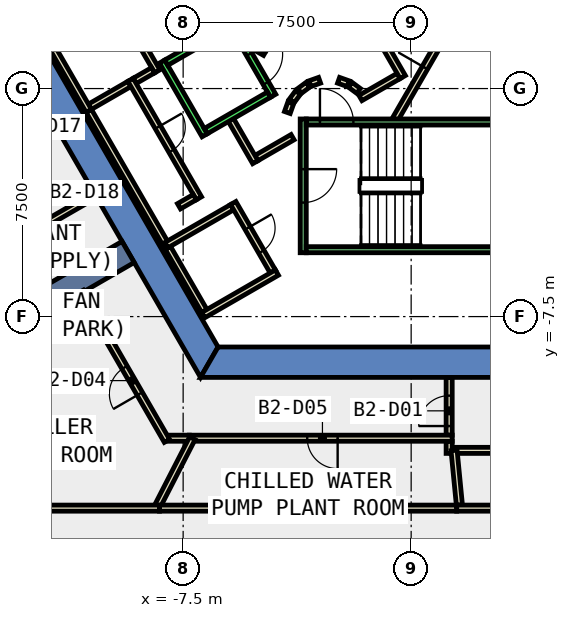
"""IFC4 building model, lengths in metres.
Left out: names, types, materials, properties, quantities, classifications, styles, units other than length and angle.
Written with IfcOpenShell. Run it as: python <this file> out.ifc"""

import sys

from ifc_helpers import new_model, si_unit, direction, frame, frame_2d, origin, place, context, subcontext, project, spatial, polyline, rectangle, outline, extrude, element, fill, save


model = new_model("IFC4")
c1 = context("Model", 3, precision=1e-05, world=origin(), true_north=direction((0.0, 1.0)))
c2 = subcontext(c1, "Body", "Model", "MODEL_VIEW")
j1 = project(units=[si_unit("LENGTHUNIT", "METRE"), si_unit("PLANEANGLEUNIT", "RADIAN")], contexts=[c1])
p1 = place(None, origin())
s1 = spatial("IfcSite", under=j1, at=p1, CompositionType="ELEMENT")
p2 = place(p1, origin())
s2 = spatial("IfcBuilding", under=s1, at=p2, CompositionType="ELEMENT")
p3 = place(p2, frame((0.0, 0.0, -11.0)))
s3 = spatial("IfcBuildingStorey", under=s2, at=p3, CompositionType="ELEMENT", Elevation=-11.0)
p4 = place(p3, frame((0.0, 0.0, -0.42)))
e1 = element("IfcWall", 1, at=p4, inside=s3, PredefinedType="SHEAR", context=c2, shape_type="SweptSolid", body=[
    extrude(outline(polyline([(-13.856, 2.5), (-6.928, -9.5), (-6.351, -8.5), (-12.702, 2.5), (-13.856, 2.5)])), origin(), (0.0, 0.0, 1.0), 5.5),
])
p5 = place(p3, frame((0.0, 0.0, -0.42)))
e2 = element("IfcWall", 2, at=p5, inside=s3, PredefinedType="SHEAR", context=c2, shape_type="SweptSolid", body=[
    extrude(outline(polyline([(3.75, -9.5), (3.75, -8.5), (-6.351, -8.5), (-6.928, -9.5), (3.75, -9.5)])), origin(), (0.0, 0.0, 1.0), 5.5),
])
p6 = place(p3, frame((-9.31, -5.375, -0.42), z_axis=(0.0, 0.0, 1.0), x_axis=(-0.866017533419, -0.500013631625, 0.0)))
e3 = element("IfcWall", 3, at=p6, inside=s3, PredefinedType="SHEAR", context=c2, shape_type="SweptSolid", body=[
    extrude(rectangle(XDim=9.0, YDim=0.8, at=frame_2d((4.5, 0.0))), origin(), (0.0, 0.0, 1.0), 5.5),
])
p7 = place(p3, frame((1.25, -11.4, 0.0), z_axis=(0.0, 0.0, 1.0), x_axis=(0.0, 1.0, 0.0)))
e4 = element("IfcWall", 4, at=p7, inside=s3, PredefinedType="PARTITIONING", context=c2, shape_type="SweptSolid", body=[
    extrude(rectangle(XDim=1.9, YDim=0.2, at=frame_2d((0.95, 0.0))), origin(), (0.0, 0.0, 1.0), 5.05),
])
p8 = place(p7, frame((0.3, 0.0, 0.0)))
e5 = element("IfcOpeningElement", 5, at=p8, cuts=e4, PredefinedType="OPENING", context=c2, shape_type="SweptSolid", body=[
    extrude(rectangle(XDim=1.0, YDim=2.1, at=frame_2d((0.5, 1.05))), frame((0.0, 0.11, 0.0), z_axis=(0.0, -1.0, 0.0), x_axis=(1.0, 0.0, 0.0)), (0.0, 0.0, 1.0), 0.22),
])
p9 = place(p3, frame((8.35, -11.9, 0.0), z_axis=(0.0, 0.0, 1.0), x_axis=(-1.0, 0.0, 0.0)))
e6 = element("IfcWall", 6, at=p9, inside=s3, PredefinedType="PARTITIONING", context=c2, shape_type="SweptSolid", body=[
    extrude(rectangle(XDim=7.039, YDim=0.2, at=frame_2d((3.52, 0.0))), origin(), (0.0, 0.0, 1.0), 5.05),
])
p10 = place(p9, frame((2.659, 0.0, 0.0)))
e7 = element("IfcOpeningElement", 7, at=p10, cuts=e6, PredefinedType="OPENING", context=c2, shape_type="SweptSolid", body=[
    extrude(rectangle(XDim=1.0, YDim=2.1, at=frame_2d((0.5, 1.05))), frame((0.0, 0.11, 0.0), z_axis=(0.0, -1.0, 0.0), x_axis=(1.0, 0.0, 0.0)), (0.0, 0.0, 1.0), 0.22),
])
p11 = place(p3, frame((1.25, -12.0, 0.0), z_axis=(0.0, 0.0, 1.0), x_axis=(0.0, 1.0, 0.0)))
e8 = element("IfcWall", 8, at=p11, inside=s3, PredefinedType="PARTITIONING", context=c2, shape_type="SweptSolid", body=[
    extrude(rectangle(XDim=0.4, YDim=0.2, at=frame_2d((0.2, 0.0))), origin(), (0.0, 0.0, 1.0), 5.05),
])
p12 = place(p3, frame((-7.296, -11.5, 0.0), z_axis=(0.0, 0.0, 1.0), x_axis=(-1.0, 0.0, 0.0)))
e9 = element("IfcWall", 9, at=p12, inside=s3, PredefinedType="PARTITIONING", context=c2, shape_type="SweptSolid", body=[
    extrude(rectangle(XDim=0.687, YDim=0.2, at=frame_2d((0.344, 0.0))), origin(), (0.0, 0.0, 1.0), 5.05),
])
p13 = place(p3, frame((-8.033, -11.587, 0.0), z_axis=(0.0, 0.0, 1.0), x_axis=(-0.499974742752, 0.866039985572, 0.0)))
e10 = element("IfcWall", 10, at=p13, inside=s3, PredefinedType="PARTITIONING", context=c2, shape_type="SweptSolid", body=[
    extrude(rectangle(XDim=5.668, YDim=0.2, at=frame_2d((2.834, 0.0))), origin(), (0.0, 0.0, 1.0), 5.05),
])
p14 = place(p13, frame((1.788, 0.0, 0.0)))
e11 = element("IfcOpeningElement", 11, at=p14, cuts=e10, PredefinedType="OPENING", context=c2, shape_type="SweptSolid", body=[
    extrude(rectangle(XDim=1.0, YDim=2.1, at=frame_2d((0.5, 1.05))), frame((0.0, 0.11, 0.0), z_axis=(0.0, -1.0, 0.0), x_axis=(1.0, 0.0, 0.0)), (0.0, 0.0, 1.0), 0.22),
])
p15 = place(p3, frame((1.35, -11.5, 0.0), z_axis=(0.0, 0.0, 1.0), x_axis=(-1.0, 0.0, 0.0)))
e12 = element("IfcWall", 12, at=p15, inside=s3, PredefinedType="PARTITIONING", context=c2, shape_type="SweptSolid", body=[
    extrude(rectangle(XDim=8.646, YDim=0.2, at=frame_2d((4.323, 0.0))), origin(), (0.0, 0.0, 1.0), 5.05),
])
p16 = place(p15, frame((3.768, 0.0, 0.0)))
e13 = element("IfcOpeningElement", 13, at=p16, cuts=e12, PredefinedType="OPENING", context=c2, shape_type="SweptSolid", body=[
    extrude(rectangle(XDim=1.0, YDim=2.1, at=frame_2d((0.5, 1.05))), frame((0.0, 0.11, 0.0), z_axis=(0.0, -1.0, 0.0), x_axis=(1.0, 0.0, 0.0)), (0.0, 0.0, 1.0), 0.22),
])
p17 = place(p3, frame((1.587, -13.7, 0.0), z_axis=(0.0, 0.0, 1.0), x_axis=(-0.097324991698, 0.99525265435, 0.0)))
e14 = element("IfcWall", 14, at=p17, inside=s3, PredefinedType="PARTITIONING", context=c2, shape_type="SweptSolid", body=[
    extrude(rectangle(XDim=1.809, YDim=0.2, at=frame_2d((0.904, 0.0))), origin(), (0.0, 0.0, 1.0), 5.05),
])
p18 = place(p3, frame((12.651, -13.8, 0.0), z_axis=(0.0, 0.0, 1.0), x_axis=(-1.0, 0.0, 0.0)))
e15 = element("IfcWall", 15, at=p18, inside=s3, PredefinedType="PARTITIONING", context=c2, shape_type="SweptSolid", body=[
    extrude(rectangle(XDim=11.154, YDim=0.2, at=frame_2d((5.577, 0.0))), origin(), (0.0, 0.0, 1.0), 5.05),
])
p19 = place(p18, frame((6.675, 0.0, 0.0)))
e16 = element("IfcOpeningElement", 16, at=p19, cuts=e15, PredefinedType="OPENING", context=c2, shape_type="SweptSolid", body=[
    extrude(rectangle(XDim=1.8, YDim=2.1, at=frame_2d((0.9, 1.05))), frame((0.0, 0.11, 0.0), z_axis=(0.0, -1.0, 0.0), x_axis=(1.0, 0.0, 0.0)), (0.0, 0.0, 1.0), 0.22),
])
p20 = place(p3, frame((-7.196, -11.5, 0.0), z_axis=(0.0, 0.0, 1.0), x_axis=(-0.457008432814, -0.889462361394, 0.0)))
e17 = element("IfcWall", 17, at=p20, inside=s3, PredefinedType="PARTITIONING", context=c2, shape_type="SweptSolid", body=[
    extrude(rectangle(XDim=2.486, YDim=0.2, at=frame_2d((1.243, 0.0))), origin(), (0.0, 0.0, 1.0), 5.05),
])
p21 = place(p3, frame((-8.278, -13.8, 0.0), z_axis=(0.0, 0.0, 1.0), x_axis=(-1.0, 0.0, 0.0)))
e18 = element("IfcWall", 18, at=p21, inside=s3, PredefinedType="PARTITIONING", context=c2, shape_type="SweptSolid", body=[
    extrude(rectangle(XDim=6.822, YDim=0.2, at=frame_2d((3.411, 0.0))), origin(), (0.0, 0.0, 1.0), 5.05),
])
p22 = place(p3, frame((1.497, -13.8, 0.0), z_axis=(0.0, 0.0, 1.0), x_axis=(-1.0, 0.0, 0.0)))
e19 = element("IfcWall", 19, at=p22, inside=s3, PredefinedType="PARTITIONING", context=c2, shape_type="SweptSolid", body=[
    extrude(rectangle(XDim=9.775, YDim=0.2, at=frame_2d((4.888, 0.0))), origin(), (0.0, 0.0, 1.0), 5.05),
])
p23 = place(p3, frame((-10.392, -3.5, 0.0), z_axis=(0.0, 0.0, 1.0), x_axis=(-0.865980106173, -0.500078449558, 0.0)))
e20 = element("IfcWall", 20, at=p23, inside=s3, PredefinedType="PARTITIONING", context=c2, shape_type="SweptSolid", body=[
    extrude(rectangle(XDim=1.9, YDim=0.2, at=frame_2d((0.95, 0.0))), origin(), (0.0, 0.0, 1.0), 5.05),
])
p24 = place(p3, frame((-9.267, 0.152, 0.0), z_axis=(0.0, 0.0, 1.0), x_axis=(-0.86599040064, -0.500060622324, 0.0)))
e21 = element("IfcWall", 21, at=p24, inside=s3, PredefinedType="PARTITIONING", context=c2, shape_type="SweptSolid", body=[
    extrude(rectangle(XDim=1.5, YDim=0.2, at=frame_2d((0.75, 0.0))), origin(), (0.0, 0.0, 1.0), 5.05),
])
p25 = place(p3, frame((-9.651, 2.817, 0.0), z_axis=(0.0, 0.0, 1.0), x_axis=(0.49989585183, -0.866085525409, 0.0)))
e22 = element("IfcWall", 22, at=p25, inside=s3, PredefinedType="PARTITIONING", context=c2, shape_type="SweptSolid", body=[
    extrude(rectangle(XDim=2.6, YDim=0.2, at=frame_2d((1.3, 0.0))), origin(), (0.0, 0.0, 1.0), 5.05),
])
p26 = place(p25, frame((0.75, 0.0, 0.0)))
e23 = element("IfcOpeningElement", 23, at=p26, cuts=e22, PredefinedType="OPENING", context=c2, shape_type="SweptSolid", body=[
    extrude(rectangle(XDim=0.9, YDim=2.1, at=frame_2d((0.45, 1.05))), frame((0.0, 0.11, 0.0), z_axis=(0.0, -1.0, 0.0), x_axis=(1.0, 0.0, 0.0)), (0.0, 0.0, 1.0), 0.22),
])
p27 = place(p3, frame((-8.488, 0.602, 0.0), z_axis=(0.0, 0.0, 1.0), x_axis=(-0.865871789474, -0.500265973451, 0.0)))
e24 = element("IfcWall", 24, at=p27, inside=s3, PredefinedType="PARTITIONING", context=c2, shape_type="SweptSolid", body=[
    extrude(rectangle(XDim=0.7, YDim=0.2, at=frame_2d((0.35, 0.0))), origin(), (0.0, 0.0, 1.0), 5.05),
])
p28 = place(p3, frame((-10.603, -0.735, 0.0), z_axis=(0.0, 0.0, 1.0), x_axis=(-0.499925626596, 0.866068339032, 0.0)))
e25 = element("IfcWall", 25, at=p28, inside=s3, PredefinedType="PARTITIONING", context=c2, shape_type="SweptSolid", body=[
    extrude(rectangle(XDim=2.601, YDim=0.2, at=frame_2d((1.3, 0.0))), origin(), (0.0, 0.0, 1.0), 5.05),
])
p29 = place(p3, frame((-9.231, 0.288, 0.0), z_axis=(0.0, 0.0, 1.0), x_axis=(0.500013631625, -0.866017533419, 0.0)))
e26 = element("IfcWall", 26, at=p29, inside=s3, PredefinedType="PARTITIONING", context=c2, shape_type="SweptSolid", body=[
    extrude(rectangle(XDim=4.5, YDim=0.2, at=frame_2d((2.25, 0.0))), origin(), (0.0, 0.0, 1.0), 5.05),
])
p30 = place(p29, frame((1.8, 0.0, 0.0)))
e27 = element("IfcOpeningElement", 27, at=p30, cuts=e26, PredefinedType="OPENING", context=c2, shape_type="SweptSolid", body=[
    extrude(rectangle(XDim=0.9, YDim=2.1, at=frame_2d((0.45, 1.05))), frame((0.0, 0.11, 0.0), z_axis=(0.0, -1.0, 0.0), x_axis=(1.0, 0.0, 0.0)), (0.0, 0.0, 1.0), 0.22),
])
p31 = place(p3, frame((-7.117, -3.572, 0.0), z_axis=(0.0, 0.0, 1.0), x_axis=(-0.866158505053, -0.499769390944, 0.0)))
e28 = element("IfcWall", 28, at=p31, inside=s3, PredefinedType="PARTITIONING", context=c2, shape_type="SweptSolid", body=[
    extrude(rectangle(XDim=0.6, YDim=0.2, at=frame_2d((0.3, 0.0))), origin(), (0.0, 0.0, 1.0), 5.05),
])
p32 = place(p3, frame((-8.003, -5.238, 0.0), z_axis=(0.0, 0.0, 1.0), x_axis=(-0.500047596559, 0.865997922154, 0.0)))
e29 = element("IfcWall", 29, at=p32, inside=s3, PredefinedType="PARTITIONING", context=c2, shape_type="SweptSolid", body=[
    extrude(rectangle(XDim=5.2, YDim=0.2, at=frame_2d((2.6, 0.0))), origin(), (0.0, 0.0, 1.0), 5.05),
])
p33 = place(p3, frame((-6.803, -7.317, 0.0), z_axis=(0.0, 0.0, 1.0), x_axis=(-0.499913221443, 0.866075499611, 0.0)))
e30 = element("IfcWall", 30, at=p33, inside=s3, PredefinedType="PARTITIONING", context=c2, shape_type="SweptSolid", body=[
    extrude(rectangle(XDim=2.4, YDim=0.2, at=frame_2d((1.2, 0.0))), origin(), (0.0, 0.0, 1.0), 5.05),
])
p34 = place(p3, frame((-8.053, -5.151, 0.0), z_axis=(0.0, 0.0, 1.0), x_axis=(0.866234368172, 0.499637888272, 0.0)))
e31 = element("IfcWall", 31, at=p34, inside=s3, PredefinedType="PARTITIONING", context=c2, shape_type="SweptSolid", body=[
    extrude(rectangle(XDim=2.499, YDim=0.2, at=frame_2d((1.25, 0.0))), origin(), (0.0, 0.0, 1.0), 5.05),
])
p35 = place(p3, frame((-5.851, -3.765, 0.0), z_axis=(0.0, 0.0, 1.0), x_axis=(0.499925626596, -0.866068339032, 0.0)))
e32 = element("IfcWall", 32, at=p35, inside=s3, PredefinedType="PARTITIONING", context=c2, shape_type="SweptSolid", body=[
    extrude(rectangle(XDim=2.601, YDim=0.2, at=frame_2d((1.3, 0.0))), origin(), (0.0, 0.0, 1.0), 5.05),
])
p36 = place(p35, frame((0.95, 0.0, 0.0)))
e33 = element("IfcOpeningElement", 33, at=p36, cuts=e32, PredefinedType="OPENING", context=c2, shape_type="SweptSolid", body=[
    extrude(rectangle(XDim=0.9, YDim=2.1, at=frame_2d((0.45, 1.05))), frame((0.0, 0.11, 0.0), z_axis=(0.0, -1.0, 0.0), x_axis=(1.0, 0.0, 0.0)), (0.0, 0.0, 1.0), 0.22),
])
p37 = place(p3, frame((-4.415, -6.053, 0.0), z_axis=(0.0, 0.0, 1.0), x_axis=(-0.866056369097, -0.49994636267, 0.0)))
e34 = element("IfcWall", 34, at=p37, inside=s3, PredefinedType="PARTITIONING", context=c2, shape_type="SweptSolid", body=[
    extrude(rectangle(XDim=2.8, YDim=0.2, at=frame_2d((1.4, 0.0))), origin(), (0.0, 0.0, 1.0), 5.05),
])
p38 = place(p3, frame((-0.52, -1.0, 0.0), z_axis=(0.0, 0.0, 1.0), x_axis=(0.50011622646, 0.865958290007, 0.0)))
e35 = element("IfcWall", 35, at=p38, inside=s3, PredefinedType="PARTITIONING", context=c2, shape_type="SweptSolid", body=[
    extrude(rectangle(XDim=4.991, YDim=0.2, at=frame_2d((2.496, 0.0))), origin(), (0.0, 0.0, 1.0), 5.05),
])
p39 = place(p38, frame((1.945, 0.0, 0.0)))
e36 = element("IfcOpeningElement", 36, at=p39, cuts=e35, PredefinedType="OPENING", context=c2, shape_type="SweptSolid", body=[
    extrude(rectangle(XDim=1.0, YDim=2.1, at=frame_2d((0.5, 1.05))), frame((0.0, 0.11, 0.0), z_axis=(0.0, -1.0, 0.0), x_axis=(1.0, 0.0, 0.0)), (0.0, 0.0, 1.0), 0.22),
])
p40 = place(p3, frame((-0.412, 0.414, 0.0), z_axis=(0.0, 0.0, 1.0), x_axis=(-0.866017369001, -0.500013916395, 0.0)))
e37 = element("IfcWall", 37, at=p40, inside=s3, PredefinedType="PARTITIONING", context=c2, shape_type="SweptSolid", body=[
    extrude(rectangle(XDim=1.45, YDim=0.2, at=frame_2d((0.725, 0.0))), origin(), (0.0, 0.0, 1.0), 5.05),
])
p41 = place(p3, frame((-1.731, -0.077, 0.0), z_axis=(0.0, 0.0, 1.0), x_axis=(-0.804311165252, 0.594208338422, 0.0)))
e38 = element("IfcWall", 38, at=p41, inside=s3, PredefinedType="PARTITIONING", context=c2, shape_type="SweptSolid", body=[
    extrude(rectangle(XDim=0.338, YDim=0.2, at=frame_2d((0.169, 0.0))), origin(), (0.0, 0.0, 1.0), 5.05),
])
p42 = place(p3, frame((-2.07, 0.16, 0.0), z_axis=(0.0, 0.0, 1.0), x_axis=(-0.942199461132, 0.335052496547, 0.0)))
e39 = element("IfcWall", 39, at=p42, inside=s3, PredefinedType="PARTITIONING", context=c2, shape_type="SweptSolid", body=[
    extrude(rectangle(XDim=0.337, YDim=0.2, at=frame_2d((0.169, 0.0))), origin(), (0.0, 0.0, 1.0), 5.05),
])
p43 = place(p3, frame((-3.012, 0.273, 0.0), z_axis=(0.0, 0.0, 1.0), x_axis=(-0.942280615813, -0.334824194261, 0.0)))
e40 = element("IfcWall", 40, at=p43, inside=s3, PredefinedType="PARTITIONING", context=c2, shape_type="SweptSolid", body=[
    extrude(rectangle(XDim=0.338, YDim=0.2, at=frame_2d((0.169, 0.0))), origin(), (0.0, 0.0, 1.0), 5.05),
])
p44 = place(p3, frame((-3.397, 0.124, 0.0), z_axis=(0.0, 0.0, 1.0), x_axis=(-0.804311165252, -0.594208338422, 0.0)))
e41 = element("IfcWall", 41, at=p44, inside=s3, PredefinedType="PARTITIONING", context=c2, shape_type="SweptSolid", body=[
    extrude(rectangle(XDim=0.338, YDim=0.2, at=frame_2d((0.169, 0.0))), origin(), (0.0, 0.0, 1.0), 5.05),
])
p45 = place(p3, frame((-3.723, -0.131, 0.0), z_axis=(0.0, 0.0, 1.0), x_axis=(-0.594675113454, -0.803966112121, 0.0)))
e42 = element("IfcWall", 42, at=p45, inside=s3, PredefinedType="PARTITIONING", context=c2, shape_type="SweptSolid", body=[
    extrude(rectangle(XDim=0.338, YDim=0.2, at=frame_2d((0.169, 0.0))), origin(), (0.0, 0.0, 1.0), 5.05),
])
p46 = place(p3, frame((-3.96, -0.47, 0.0), z_axis=(0.0, 0.0, 1.0), x_axis=(-0.334824194261, -0.942280615813, 0.0)))
e43 = element("IfcWall", 43, at=p46, inside=s3, PredefinedType="PARTITIONING", context=c2, shape_type="SweptSolid", body=[
    extrude(rectangle(XDim=0.338, YDim=0.2, at=frame_2d((0.169, 0.0))), origin(), (0.0, 0.0, 1.0), 5.05),
])
p47 = place(p3, frame((-3.9, -1.599, 0.0), z_axis=(0.0, 0.0, 1.0), x_axis=(-0.865969445389, -0.500096910261, 0.0)))
e44 = element("IfcWall", 44, at=p47, inside=s3, PredefinedType="PARTITIONING", context=c2, shape_type="SweptSolid", body=[
    extrude(rectangle(XDim=1.373, YDim=0.2, at=frame_2d((0.687, 0.0))), origin(), (0.0, 0.0, 1.0), 5.05),
])
p48 = place(p3, frame((-5.126, -2.422, 0.0), z_axis=(0.0, 0.0, 1.0), x_axis=(-0.500062241894, 0.865989465428, 0.0)))
e45 = element("IfcWall", 45, at=p48, inside=s3, PredefinedType="PARTITIONING", context=c2, shape_type="SweptSolid", body=[
    extrude(rectangle(XDim=1.7, YDim=0.2, at=frame_2d((0.85, 0.0))), origin(), (0.0, 0.0, 1.0), 5.05),
])
p49 = place(p3, frame((-2.771, 4.7, 0.0), z_axis=(0.0, 0.0, 1.0), x_axis=(0.499969479948, -0.866043023828, 0.0)))
e46 = element("IfcWall", 46, at=p49, inside=s3, PredefinedType="PARTITIONING", context=c2, shape_type="SweptSolid", body=[
    extrude(rectangle(XDim=4.99, YDim=0.2, at=frame_2d((2.495, 0.0))), origin(), (0.0, 0.0, 1.0), 5.05),
])
p50 = place(p49, frame((1.945, 0.0, 0.0)))
e47 = element("IfcOpeningElement", 47, at=p50, cuts=e46, PredefinedType="OPENING", context=c2, shape_type="SweptSolid", body=[
    extrude(rectangle(XDim=1.0, YDim=2.1, at=frame_2d((0.5, 1.05))), frame((0.0, 0.11, 0.0), z_axis=(0.0, -1.0, 0.0), x_axis=(1.0, 0.0, 0.0)), (0.0, 0.0, 1.0), 0.22),
])
p51 = place(p3, frame((-5.94, 2.188, 0.0), z_axis=(0.0, 0.0, 1.0), x_axis=(0.49994636267, -0.866056369097, 0.0)))
e48 = element("IfcWall", 48, at=p51, inside=s3, PredefinedType="STANDARD", context=c2, shape_type="SweptSolid", body=[
    extrude(rectangle(XDim=2.8, YDim=0.2, at=frame_2d((1.4, 0.0))), origin(), (0.0, 0.0, 1.0), 5.05),
])
p52 = place(p51, frame((1.225, 0.0, 0.0)))
e49 = element("IfcOpeningElement", 49, at=p52, cuts=e48, PredefinedType="OPENING", context=c2, shape_type="SweptSolid", body=[
    extrude(rectangle(XDim=1.1, YDim=2.1, at=frame_2d((0.55, 1.05))), frame((0.0, 0.11, 0.0), z_axis=(0.0, -1.0, 0.0), x_axis=(1.0, 0.0, 0.0)), (0.0, 0.0, 1.0), 0.22),
])
p53 = place(p3, frame((-8.192, 0.888, 0.0), z_axis=(0.0, 0.0, 1.0), x_axis=(0.49994636267, -0.866056369097, 0.0)))
e50 = element("IfcWall", 50, at=p53, inside=s3, PredefinedType="STANDARD", context=c2, shape_type="SweptSolid", body=[
    extrude(rectangle(XDim=2.8, YDim=0.2, at=frame_2d((1.4, 0.0))), origin(), (0.0, 0.0, 1.0), 5.05),
])
for number, where, z_axis, x_axis in (
    (51, (-5.977, 2.052, 0.0), (0.0, 0.0, 1.0), (-0.866, -0.5, 0.0)),
    (52, (-4.677, -0.2, 0.0), (0.0, 0.0, 1.0), (-0.866, -0.5, 0.0)),
):
    element("IfcWall", number, at=place(p3, frame(where, z_axis=z_axis, x_axis=x_axis)), inside=s3, PredefinedType="STANDARD", context=c2, shape_type="SweptSolid", body=[
        extrude(rectangle(XDim=2.399, YDim=0.2, at=frame_2d((1.2, 0.0))), origin(), (0.0, 0.0, 1.0), 5.05),
    ])
p54 = place(p3, frame((-3.55, -1.0, 0.0), z_axis=(0.0, 0.0, 1.0), x_axis=(0.0, -1.0, 0.0)))
e53 = element("IfcWall", 53, at=p54, inside=s3, PredefinedType="STANDARD", context=c2, shape_type="SweptSolid", body=[
    extrude(rectangle(XDim=4.4, YDim=0.2, at=frame_2d((2.2, 0.0))), origin(), (0.0, 0.0, 1.0), 5.05),
])
p55 = place(p54, frame((1.65, 0.0, 0.0)))
e54 = element("IfcOpeningElement", 54, at=p55, cuts=e53, PredefinedType="OPENING", context=c2, shape_type="SweptSolid", body=[
    extrude(rectangle(XDim=1.1, YDim=2.2, at=frame_2d((0.55, 1.1))), frame((0.0, 0.11, 0.0), z_axis=(0.0, -1.0, 0.0), x_axis=(1.0, 0.0, 0.0)), (0.0, 0.0, 1.0), 0.22),
])
p56 = place(p3, frame((-3.45, -1.1, 0.0), z_axis=(0.0, 0.0, 1.0), x_axis=(1.0, 0.0, 0.0)))
e55 = element("IfcWall", 55, at=p56, inside=s3, PredefinedType="STANDARD", context=c2, shape_type="SweptSolid", body=[
    extrude(rectangle(XDim=6.9, YDim=0.2, at=frame_2d((3.45, 0.0))), origin(), (0.0, 0.0, 1.0), 5.05),
])
p57 = place(p56, frame((0.45, 0.0, 0.0)))
e56 = element("IfcOpeningElement", 56, at=p57, cuts=e55, PredefinedType="OPENING", context=c2, shape_type="SweptSolid", body=[
    extrude(rectangle(XDim=1.1, YDim=2.2, at=frame_2d((0.55, 1.1))), frame((0.0, 0.11, 0.0), z_axis=(0.0, -1.0, 0.0), x_axis=(1.0, 0.0, 0.0)), (0.0, 0.0, 1.0), 0.22),
])
p58 = place(p3, frame((-3.45, -5.3, 0.0), z_axis=(0.0, 0.0, 1.0), x_axis=(1.0, 0.0, 0.0)))
e57 = element("IfcWall", 57, at=p58, inside=s3, PredefinedType="STANDARD", context=c2, shape_type="SweptSolid", body=[
    extrude(rectangle(XDim=6.9, YDim=0.2, at=frame_2d((3.45, 0.0))), origin(), (0.0, 0.0, 1.0), 5.05),
])
p59 = place(p3, frame((-4.806, 1.176, 0.0), z_axis=(0.0, 0.0, 1.0), x_axis=(-0.866558586415, 0.499075361355, 0.0)))
e58 = element("IfcWall", 58, at=p59, inside=s3, PredefinedType="STANDARD", context=c2, shape_type="SweptSolid", body=[
    extrude(rectangle(XDim=0.751, YDim=0.2, at=frame_2d((0.376, 0.0))), origin(), (0.0, 0.0, 1.0), 5.05),
])
p60 = place(p8, origin())
e59 = element("IfcDoor", 59, at=p60, inside=s3, OperationType="SINGLE_SWING_LEFT", PredefinedType="DOOR", context=c2, shape_type="SweptSolid", body=[
    extrude(rectangle(XDim=1.0, YDim=2.1, at=frame_2d((0.5, 1.05))), frame((0.0, 0.025, 0.0), z_axis=(0.0, -1.0, 0.0), x_axis=(1.0, 0.0, 0.0)), (0.0, 0.0, 1.0), 0.05),
])
fill(e5, e59)
p61 = place(p14, origin())
e60 = element("IfcDoor", 60, at=p61, inside=s3, OperationType="SINGLE_SWING_RIGHT", PredefinedType="DOOR", context=c2, shape_type="SweptSolid", body=[
    extrude(rectangle(XDim=1.0, YDim=2.1, at=frame_2d((0.5, 1.05))), frame((0.0, 0.025, 0.0), z_axis=(0.0, -1.0, 0.0), x_axis=(1.0, 0.0, 0.0)), (0.0, 0.0, 1.0), 0.05),
])
fill(e11, e60)
p62 = place(p16, origin())
e61 = element("IfcDoor", 61, at=p62, inside=s3, OperationType="SINGLE_SWING_LEFT", PredefinedType="DOOR", context=c2, shape_type="SweptSolid", body=[
    extrude(rectangle(XDim=1.0, YDim=2.1, at=frame_2d((0.5, 1.05))), frame((0.0, 0.025, 0.0), z_axis=(0.0, -1.0, 0.0), x_axis=(1.0, 0.0, 0.0)), (0.0, 0.0, 1.0), 0.05),
])
fill(e13, e61)
p63 = place(p39, origin())
e62 = element("IfcDoor", 62, at=p63, inside=s3, OperationType="SINGLE_SWING_LEFT", PredefinedType="DOOR", context=c2, shape_type="SweptSolid", body=[
    extrude(rectangle(XDim=1.0, YDim=2.1, at=frame_2d((0.5, 1.05))), frame((0.0, 0.025, 0.0), z_axis=(0.0, -1.0, 0.0), x_axis=(1.0, 0.0, 0.0)), (0.0, 0.0, 1.0), 0.05),
])
fill(e36, e62)
p64 = place(p30, origin())
e63 = element("IfcDoor", 63, at=p64, inside=s3, OperationType="SINGLE_SWING_LEFT", PredefinedType="DOOR", context=c2, shape_type="SweptSolid", body=[
    extrude(rectangle(XDim=0.9, YDim=2.1, at=frame_2d((0.45, 1.05))), frame((0.0, 0.025, 0.0), z_axis=(0.0, -1.0, 0.0), x_axis=(1.0, 0.0, 0.0)), (0.0, 0.0, 1.0), 0.05),
])
fill(e27, e63)
p65 = place(p36, origin())
e64 = element("IfcDoor", 64, at=p65, inside=s3, OperationType="SINGLE_SWING_LEFT", PredefinedType="DOOR", context=c2, shape_type="SweptSolid", body=[
    extrude(rectangle(XDim=0.9, YDim=2.1, at=frame_2d((0.45, 1.05))), frame((0.0, 0.025, 0.0), z_axis=(0.0, -1.0, 0.0), x_axis=(1.0, 0.0, 0.0)), (0.0, 0.0, 1.0), 0.05),
])
fill(e33, e64)
p66 = place(p52, origin())
e65 = element("IfcDoor", 65, at=p66, inside=s3, OperationType="SLIDING_TO_LEFT", PredefinedType="DOOR", context=c2, shape_type="SweptSolid", body=[
    extrude(rectangle(XDim=1.1, YDim=2.1, at=frame_2d((0.55, 1.05))), frame((0.0, 0.025, 0.0), z_axis=(0.0, -1.0, 0.0), x_axis=(1.0, 0.0, 0.0)), (0.0, 0.0, 1.0), 0.05),
])
fill(e49, e65)
p67 = place(p57, origin())
e66 = element("IfcDoor", 66, at=p67, inside=s3, OperationType="SINGLE_SWING_LEFT", PredefinedType="DOOR", context=c2, shape_type="SweptSolid", body=[
    extrude(rectangle(XDim=1.1, YDim=2.2, at=frame_2d((0.55, 1.1))), frame((0.0, 0.025, 0.0), z_axis=(0.0, -1.0, 0.0), x_axis=(1.0, 0.0, 0.0)), (0.0, 0.0, 1.0), 0.05),
])
fill(e56, e66)
p68 = place(p55, origin())
e67 = element("IfcDoor", 67, at=p68, inside=s3, OperationType="SINGLE_SWING_LEFT", PredefinedType="DOOR", context=c2, shape_type="SweptSolid", body=[
    extrude(rectangle(XDim=1.1, YDim=2.2, at=frame_2d((0.55, 1.1))), frame((0.0, 0.025, 0.0), z_axis=(0.0, -1.0, 0.0), x_axis=(1.0, 0.0, 0.0)), (0.0, 0.0, 1.0), 0.05),
])
fill(e54, e67)
save(model, sys.argv[1])
